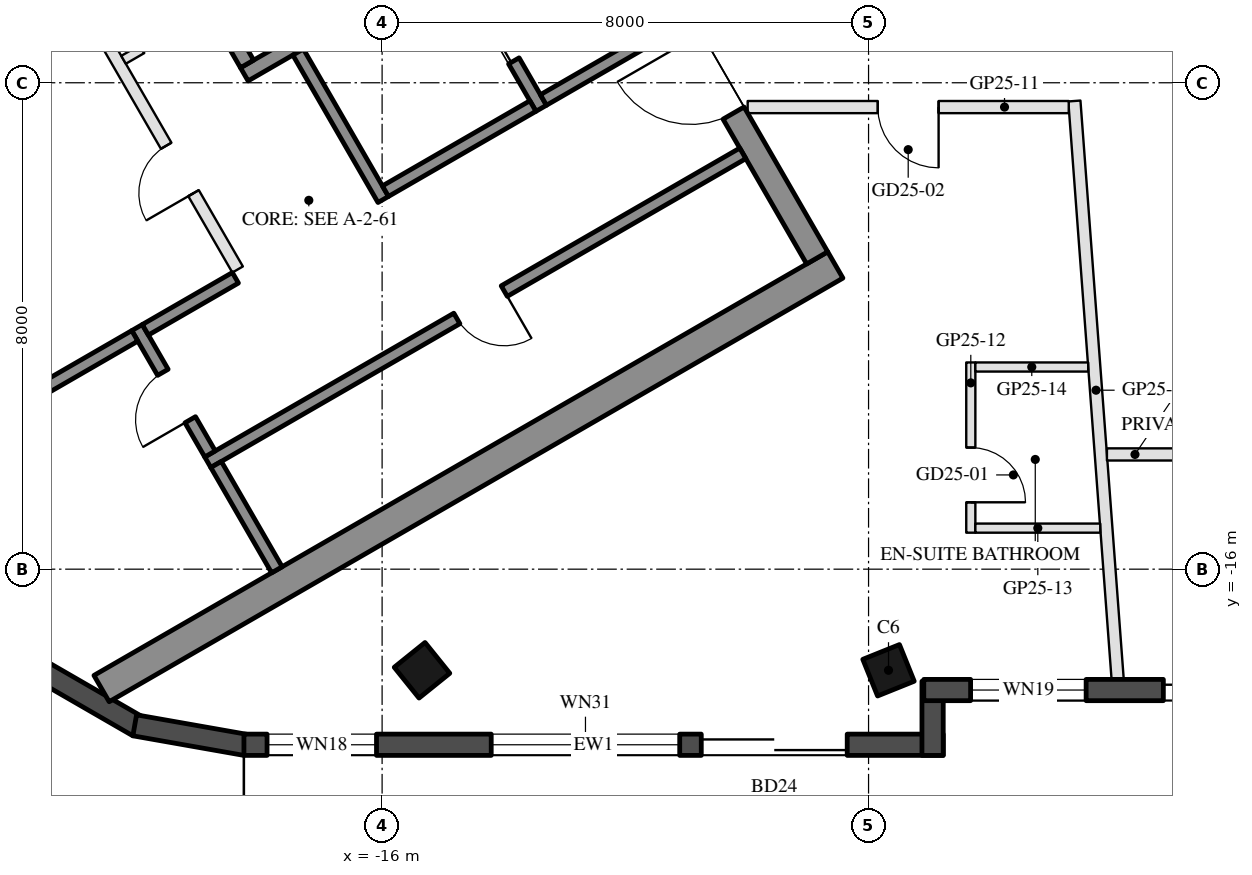
"""IFC4 building model, lengths in metres.
Left out: names, types, materials, properties, quantities, classifications, styles, units other than length and angle.
Written with IfcOpenShell. Run it as: python <this file> out.ifc"""

import sys

from ifc_helpers import new_model, si_unit, direction, frame, frame_2d, origin, origin_2d, place, context, subcontext, project, spatial, rectangle, hollow_rectangle, extrude, boolean, halfspace, element, fill, save


model = new_model("IFC4")
c1 = context("Model", 3, precision=1e-05, world=origin(), true_north=direction((0.0, 1.0)))
c2 = subcontext(c1, "Body", "Model", "MODEL_VIEW")
j1 = project(units=[si_unit("LENGTHUNIT", "METRE"), si_unit("PLANEANGLEUNIT", "RADIAN")], contexts=[c1])
p1 = place(None, origin())
s1 = spatial("IfcSite", under=j1, at=p1, CompositionType="ELEMENT")
p2 = place(p1, origin())
s2 = spatial("IfcBuilding", under=s1, at=p2, CompositionType="ELEMENT")
p3 = place(p2, frame((0.0, 0.0, 265.2)))
s3 = spatial("IfcBuildingStorey", under=s2, at=p3, CompositionType="ELEMENT", Elevation=265.2)
p4 = place(p3, frame((-15.344, -17.663, 0.0), z_axis=(0.121006106938, 0.150399778714, 0.981191840899), x_axis=(-0.992606962496, 0.008942251163, 0.121043191254)))
e1 = element("IfcColumn", 1, at=p4, inside=s3, PredefinedType="COLUMN", context=c2, shape_type="SweptSolid", body=[
    boolean("DIFFERENCE", boolean("DIFFERENCE", extrude(hollow_rectangle(XDim=0.65, YDim=0.65, WallThickness=0.03, at=origin_2d()), origin(), (0.0, 0.0, 1.0), 3.771), halfspace(frame((0.0, 0.0, 0.047), z_axis=(0.0, 0.0, 1.0), x_axis=(1.0, 0.0, 0.0)), True)), halfspace(frame((0.0, 0.0, 3.724), z_axis=(0.0, 0.0, 1.0), x_axis=(1.0, 0.0, 0.0)), False)),
])
p5 = place(p3, frame((-7.672, -17.663, 0.0), z_axis=(0.060870463553, 0.151232178432, 0.986622326361), x_axis=(-0.99813528898, 0.004713590867, 0.06085825296)))
e2 = element("IfcColumn", 2, at=p5, inside=s3, PredefinedType="COLUMN", context=c2, shape_type="SweptSolid", body=[
    boolean("DIFFERENCE", boolean("DIFFERENCE", extrude(hollow_rectangle(XDim=0.65, YDim=0.65, WallThickness=0.03, at=origin_2d()), origin(), (0.0, 0.0, 1.0), 3.75), halfspace(frame((0.0, 0.0, 0.04), z_axis=(0.0, 0.0, 1.0), x_axis=(1.0, 0.0, 0.0)), True)), halfspace(frame((0.0, 0.0, 3.71), z_axis=(0.0, 0.0, 1.0), x_axis=(1.0, 0.0, 0.0)), False)),
])
p6 = place(p3, frame((-23.102, -13.338, 0.0), z_axis=(0.190346159062, 0.109881938965, 0.975548204457), x_axis=(-0.499994868029, 0.866028366632, 1.1507946e-05)))
e3 = element("IfcColumn", 3, at=p6, inside=s3, PredefinedType="COLUMN", context=c2, shape_type="SweptSolid", body=[
    boolean("DIFFERENCE", boolean("DIFFERENCE", extrude(hollow_rectangle(XDim=2.0, YDim=2.0, WallThickness=0.05, at=origin_2d()), origin(), (0.0, 0.0, 1.0), 3.793), halfspace(frame((0.0, 0.0, 0.113), z_axis=(0.0, 0.0, 1.0), x_axis=(1.0, 0.0, 0.0)), True)), halfspace(frame((0.0, 0.0, 3.679), z_axis=(0.0, 0.0, 1.0), x_axis=(1.0, 0.0, 0.0)), False)),
])
p7 = place(p3, frame((-21.618, -17.662, 0.0), z_axis=(0.0, 0.0, 1.0), x_axis=(0.866080385203, -0.499904757295, 0.0)))
e4 = element("IfcWall", 4, at=p7, inside=s3, PredefinedType="SOLIDWALL", context=c2, shape_type="SweptSolid", body=[
    extrude(rectangle(XDim=1.855, YDim=0.35, at=frame_2d((0.927, 0.0))), origin(), (0.0, 0.0, 1.0), 3.55),
])
p8 = place(p3, frame((-20.069, -18.568, 0.0), z_axis=(0.0, 0.0, 1.0), x_axis=(0.984791508075, -0.173740282098, 0.0)))
e5 = element("IfcWall", 5, at=p8, inside=s3, PredefinedType="SOLIDWALL", context=c2, shape_type="SweptSolid", body=[
    extrude(rectangle(XDim=1.855, YDim=0.35, at=frame_2d((0.927, 0.0))), origin(), (0.0, 0.0, 1.0), 3.55),
])
p9 = place(p3, frame((-18.272, -18.888, 0.0), z_axis=(0.0, 0.0, 1.0), x_axis=(1.0, 0.0, 0.0)))
e6 = element("IfcWall", 6, at=p9, inside=s3, PredefinedType="SOLIDWALL", context=c2, shape_type="SweptSolid", body=[
    extrude(rectangle(XDim=11.5, YDim=0.35, at=frame_2d((5.75, 0.0))), origin(), (0.0, 0.0, 1.0), 3.55),
])
p10 = place(p9, frame((0.38, 0.0, 0.3)))
e7 = element("IfcOpeningElement", 7, at=p10, cuts=e6, PredefinedType="OPENING", context=c2, shape_type="SweptSolid", body=[
    extrude(rectangle(XDim=1.8, YDim=2.65, at=frame_2d((0.9, 1.325))), frame((0.0, 0.185, 0.0), z_axis=(0.0, -1.0, 0.0), x_axis=(1.0, 0.0, 0.0)), (0.0, 0.0, 1.0), 0.37),
])
p11 = place(p9, frame((7.521, 0.0, 0.0)))
e8 = element("IfcOpeningElement", 8, at=p11, cuts=e6, PredefinedType="OPENING", context=c2, shape_type="SweptSolid", body=[
    extrude(rectangle(XDim=2.4, YDim=2.4, at=frame_2d((1.2, 1.2))), frame((0.0, 0.185, 0.0), z_axis=(0.0, -1.0, 0.0), x_axis=(1.0, 0.0, 0.0)), (0.0, 0.0, 1.0), 0.37),
])
p12 = place(p9, frame((4.067, 0.0, 0.3)))
e9 = element("IfcOpeningElement", 9, at=p12, cuts=e6, PredefinedType="OPENING", context=c2, shape_type="SweptSolid", body=[
    extrude(rectangle(XDim=3.1, YDim=2.65, at=frame_2d((1.55, 1.325))), frame((0.0, 0.185, 0.0), z_axis=(0.0, -1.0, 0.0), x_axis=(1.0, 0.0, 0.0)), (0.0, 0.0, 1.0), 0.37),
])
p13 = place(p3, frame((-6.947, -19.063, 0.0), z_axis=(0.0, 0.0, 1.0), x_axis=(0.0, 1.0, 0.0)))
e10 = element("IfcWall", 10, at=p13, inside=s3, PredefinedType="SOLIDWALL", context=c2, shape_type="SweptSolid", body=[
    extrude(rectangle(XDim=1.22, YDim=0.35, at=frame_2d((0.61, 0.0))), origin(), (0.0, 0.0, 1.0), 3.55),
])
p14 = place(p3, frame((-7.092, -17.988, 0.0), z_axis=(0.0, 0.0, 1.0), x_axis=(1.0, 0.0, 0.0)))
e11 = element("IfcWall", 11, at=p14, inside=s3, PredefinedType="SOLIDWALL", context=c2, shape_type="SweptSolid", body=[
    extrude(rectangle(XDim=6.512, YDim=0.35, at=frame_2d((3.256, 0.0))), origin(), (0.0, 0.0, 1.0), 3.55),
])
p15 = place(p14, frame((0.77, 0.0, 0.3)))
e12 = element("IfcOpeningElement", 12, at=p15, cuts=e11, PredefinedType="OPENING", context=c2, shape_type="SweptSolid", body=[
    extrude(rectangle(XDim=1.9, YDim=2.65, at=frame_2d((0.95, 1.325))), frame((0.0, 0.185, 0.0), z_axis=(0.0, -1.0, 0.0), x_axis=(1.0, 0.0, 0.0)), (0.0, 0.0, 1.0), 0.37),
])
p16 = place(p14, frame((3.94, 0.0, 0.0)))
e13 = element("IfcOpeningElement", 13, at=p16, cuts=e11, PredefinedType="OPENING", context=c2, shape_type="SweptSolid", body=[
    extrude(rectangle(XDim=1.5, YDim=2.4, at=frame_2d((0.75, 1.2))), frame((0.0, 0.185, 0.0), z_axis=(0.0, -1.0, 0.0), x_axis=(1.0, 0.0, 0.0)), (0.0, 0.0, 1.0), 0.37),
])
for number, where, z_axis, x_axis in (
    (14, (-13.797, -1.903, 0.0), (0.0, 0.0, 1.0), (-0.866, -0.5, 0.0)),
    (15, (-8.547, -10.997, 0.0), (0.0, 0.0, 1.0), (-0.866, -0.5, 0.0)),
):
    element("IfcWall", number, at=place(p3, frame(where, z_axis=z_axis, x_axis=x_axis)), inside=s3, PredefinedType="SHEAR", context=c2, shape_type="SweptSolid", body=[
        extrude(rectangle(XDim=13.934, YDim=0.5, at=frame_2d((6.967, 0.0))), origin(), (0.0, 0.0, 1.0), 3.5),
    ])
p17 = place(p3, frame((-13.845, -2.22, 0.0), z_axis=(0.0, 0.0, 1.0), x_axis=(0.500004234368, -0.866022959057, 0.0)))
e16 = element("IfcWall", 16, at=p17, inside=s3, PredefinedType="SHEAR", context=c2, shape_type="SweptSolid", body=[
    extrude(rectangle(XDim=10.0, YDim=0.4, at=frame_2d((5.0, 0.0))), origin(), (0.0, 0.0, 1.0), 3.5),
])
p18 = place(p17, frame((3.55, 0.0, 0.0)))
e17 = element("IfcOpeningElement", 17, at=p18, cuts=e16, PredefinedType="OPENING", context=c2, shape_type="SweptSolid", body=[
    extrude(rectangle(XDim=1.1, YDim=2.1, at=frame_2d((0.55, 1.05))), frame((0.0, 0.21, 0.0), z_axis=(0.0, -1.0, 0.0), x_axis=(1.0, 0.0, 0.0)), (0.0, 0.0, 1.0), 0.42),
])
p19 = place(p17, frame((5.85, 0.0, 0.0)))
e18 = element("IfcOpeningElement", 18, at=p19, cuts=e16, PredefinedType="OPENING", context=c2, shape_type="SweptSolid", body=[
    extrude(rectangle(XDim=1.4, YDim=2.1, at=frame_2d((0.7, 1.05))), frame((0.0, 0.21, 0.0), z_axis=(0.0, -1.0, 0.0), x_axis=(1.0, 0.0, 0.0)), (0.0, 0.0, 1.0), 0.42),
])
p20 = place(p3, frame((-12.681, -4.636, 0.0), z_axis=(0.0, 0.0, 1.0), x_axis=(-0.866021702275, -0.500006411147, 0.0)))
e19 = element("IfcWall", 19, at=p20, inside=s3, PredefinedType="SHEAR", context=c2, shape_type="SweptSolid", body=[
    extrude(rectangle(XDim=6.45, YDim=0.25, at=frame_2d((3.225, 0.0))), origin(), (0.0, 0.0, 1.0), 3.5),
])
p21 = place(p20, frame((0.3, 0.0, 0.0)))
e20 = element("IfcOpeningElement", 20, at=p21, cuts=e19, PredefinedType="OPENING", context=c2, shape_type="SweptSolid", body=[
    extrude(rectangle(XDim=1.0, YDim=2.1, at=frame_2d((0.5, 1.05))), frame((0.0, 0.135, 0.0), z_axis=(0.0, -1.0, 0.0), x_axis=(1.0, 0.0, 0.0)), (0.0, 0.0, 1.0), 0.27),
])
p22 = place(p3, frame((-19.496, -5.482, 0.0), z_axis=(0.0, 0.0, 1.0), x_axis=(0.499990435942, -0.866030925526, 0.0)))
e21 = element("IfcWall", 21, at=p22, inside=s3, PredefinedType="SHEAR", context=c2, shape_type="SweptSolid", body=[
    extrude(rectangle(XDim=2.55, YDim=0.25, at=frame_2d((1.275, 0.0))), origin(), (0.0, 0.0, 1.0), 3.5),
])
p23 = place(p3, frame((-17.381, -7.495, 0.0), z_axis=(0.0, 0.0, 1.0), x_axis=(0.500011755427, -0.866018616679, 0.0)))
e22 = element("IfcWall", 22, at=p23, inside=s3, PredefinedType="SHEAR", context=c2, shape_type="SweptSolid", body=[
    extrude(rectangle(XDim=2.8, YDim=0.2, at=frame_2d((1.4, 0.0))), origin(), (0.0, 0.0, 1.0), 3.5),
])
p24 = place(p3, frame((-14.783, -5.995, 0.0), z_axis=(0.0, 0.0, 1.0), x_axis=(0.49994636267, -0.866056369097, 0.0)))
e23 = element("IfcWall", 23, at=p24, inside=s3, PredefinedType="SHEAR", context=c2, shape_type="SweptSolid", body=[
    extrude(rectangle(XDim=2.8, YDim=0.2, at=frame_2d((1.4, 0.0))), origin(), (0.0, 0.0, 1.0), 3.5),
])
p25 = place(p24, frame((0.7, 0.0, 0.0)))
e24 = element("IfcOpeningElement", 24, at=p25, cuts=e23, PredefinedType="OPENING", context=c2, shape_type="SweptSolid", body=[
    extrude(rectangle(XDim=1.2, YDim=2.1, at=frame_2d((0.6, 1.05))), frame((0.0, 0.11, 0.0), z_axis=(0.0, -1.0, 0.0), x_axis=(1.0, 0.0, 0.0)), (0.0, 0.0, 1.0), 0.22),
])
p26 = place(p3, frame((-13.52, -8.383, 0.0), z_axis=(0.0, 0.0, 1.0), x_axis=(-0.866034573852, -0.49998411664, 0.0)))
e25 = element("IfcWall", 25, at=p26, inside=s3, PredefinedType="SHEAR", context=c2, shape_type="SweptSolid", body=[
    extrude(rectangle(XDim=2.8, YDim=0.2, at=frame_2d((1.4, 0.0))), origin(), (0.0, 0.0, 1.0), 3.5),
])
p27 = place(p3, frame((-11.268, -7.083, 0.0), z_axis=(0.0, 0.0, 1.0), x_axis=(-0.866050077142, -0.499957262057, 0.0)))
e26 = element("IfcWall", 26, at=p27, inside=s3, PredefinedType="SHEAR", context=c2, shape_type="SweptSolid", body=[
    extrude(rectangle(XDim=2.4, YDim=0.2, at=frame_2d((1.2, 0.0))), origin(), (0.0, 0.0, 1.0), 3.5),
])
p28 = place(p3, frame((-10.068, -9.162, 0.0), z_axis=(0.0, 0.0, 1.0), x_axis=(-0.866032725843, -0.499987317609, 0.0)))
e27 = element("IfcWall", 27, at=p28, inside=s3, PredefinedType="SHEAR", context=c2, shape_type="SweptSolid", body=[
    extrude(rectangle(XDim=10.16, YDim=0.2, at=frame_2d((5.08, 0.0))), origin(), (0.0, 0.0, 1.0), 3.5),
])
p29 = place(p28, frame((4.53, 0.0, 0.0)))
e28 = element("IfcOpeningElement", 28, at=p29, cuts=e27, PredefinedType="OPENING", context=c2, shape_type="SweptSolid", body=[
    extrude(rectangle(XDim=0.9, YDim=2.1, at=frame_2d((0.45, 1.05))), frame((0.0, 0.11, 0.0), z_axis=(0.0, -1.0, 0.0), x_axis=(1.0, 0.0, 0.0)), (0.0, 0.0, 1.0), 0.22),
])
p30 = place(p3, frame((-20.031, -12.026, 0.0), z_axis=(0.0, 0.0, 1.0), x_axis=(0.500033551112, -0.866006032174, 0.0)))
e29 = element("IfcWall", 29, at=p30, inside=s3, PredefinedType="SHEAR", context=c2, shape_type="SweptSolid", body=[
    extrude(rectangle(XDim=2.4, YDim=0.2, at=frame_2d((1.2, 0.0))), origin(), (0.0, 0.0, 1.0), 3.5),
])
p31 = place(p30, frame((0.85, 0.0, 0.0)))
e30 = element("IfcOpeningElement", 30, at=p31, cuts=e29, PredefinedType="OPENING", context=c2, shape_type="SweptSolid", body=[
    extrude(rectangle(XDim=0.9, YDim=2.1, at=frame_2d((0.45, 1.05))), frame((0.0, 0.11, 0.0), z_axis=(0.0, -1.0, 0.0), x_axis=(1.0, 0.0, 0.0)), (0.0, 0.0, 1.0), 0.22),
])
p32 = place(p3, frame((-18.413, -11.208, 0.0), z_axis=(0.0, 0.0, 1.0), x_axis=(-0.866038183914, -0.499977863513, 0.0)))
e31 = element("IfcWall", 31, at=p32, inside=s3, PredefinedType="SHEAR", context=c2, shape_type="SweptSolid", body=[
    extrude(rectangle(XDim=1.71, YDim=0.2, at=frame_2d((0.855, 0.0))), origin(), (0.0, 0.0, 1.0), 3.5),
])
p33 = place(p3, frame((-18.73, -14.278, 0.0), z_axis=(0.0, 0.0, 1.0), x_axis=(0.50002537861, -0.866010750942, 0.0)))
e32 = element("IfcWall", 32, at=p33, inside=s3, PredefinedType="SHEAR", context=c2, shape_type="SweptSolid", body=[
    extrude(rectangle(XDim=2.0, YDim=0.2, at=frame_2d((1.0, 0.0))), origin(), (0.0, 0.0, 1.0), 3.5),
])
p34 = place(p3, frame((-20.067, -12.163, 0.0), z_axis=(0.0, 0.0, 1.0), x_axis=(-0.866079196458, -0.49990681678, 0.0)))
e33 = element("IfcWall", 33, at=p34, inside=s3, PredefinedType="SHEAR", context=c2, shape_type="SweptSolid", body=[
    extrude(rectangle(XDim=2.216, YDim=0.2, at=frame_2d((1.108, 0.0))), origin(), (0.0, 0.0, 1.0), 3.5),
])
p35 = place(p3, frame((-21.076, -6.395, 0.0), z_axis=(0.0, 0.0, 1.0), x_axis=(0.50001468107, -0.866016927499, 0.0)))
e34 = element("IfcWall", 34, at=p35, inside=s3, PredefinedType="PARTITIONING", context=c2, shape_type="SweptSolid", body=[
    extrude(rectangle(XDim=5.4, YDim=0.2, at=frame_2d((2.7, 0.0))), origin(), (0.0, 0.0, 1.0), 3.5),
])
p36 = place(p35, frame((3.05, 0.0, 0.0)))
e35 = element("IfcOpeningElement", 35, at=p36, cuts=e34, PredefinedType="OPENING", context=c2, shape_type="SweptSolid", body=[
    extrude(rectangle(XDim=0.9, YDim=2.1, at=frame_2d((0.45, 1.05))), frame((0.0, 0.11, 0.0), z_axis=(0.0, -1.0, 0.0), x_axis=(1.0, 0.0, 0.0)), (0.0, 0.0, 1.0), 0.22),
])
p37 = place(p3, frame((-18.866, -6.822, 0.0), z_axis=(0.0, 0.0, 1.0), x_axis=(-0.866028054938, -0.499995408039, 0.0)))
e36 = element("IfcWall", 36, at=p37, inside=s3, PredefinedType="PARTITIONING", context=c2, shape_type="SweptSolid", body=[
    extrude(rectangle(XDim=1.6, YDim=0.15, at=frame_2d((0.8, 0.0))), origin(), (0.0, 0.0, 1.0), 3.5),
])
p38 = place(p37, frame((0.35, 0.0, 0.0)))
e37 = element("IfcOpeningElement", 37, at=p38, cuts=e36, PredefinedType="OPENING", context=c2, shape_type="SweptSolid", body=[
    extrude(rectangle(XDim=0.9, YDim=2.1, at=frame_2d((0.45, 1.05))), frame((0.0, 0.085, 0.0), z_axis=(0.0, -1.0, 0.0), x_axis=(1.0, 0.0, 0.0)), (0.0, 0.0, 1.0), 0.17),
])
p39 = place(p3, frame((-3.903, -17.813, 0.0), z_axis=(0.0, 0.0, 1.0), x_axis=(-0.074602257677, 0.997213368918, 0.0)))
e38 = element("IfcWall", 38, at=p39, inside=s3, PredefinedType="PARTITIONING", context=c2, shape_type="SweptSolid", body=[
    extrude(rectangle(XDim=9.54, YDim=0.2, at=frame_2d((4.77, 0.0))), origin(), (0.0, 0.0, 1.0), 3.1),
])
p40 = place(p3, frame((-4.708, -8.4, 0.0), z_axis=(0.0, 0.0, 1.0), x_axis=(-1.0, 0.0, 0.0)))
e39 = element("IfcWall", 39, at=p40, inside=s3, PredefinedType="PARTITIONING", context=c2, shape_type="SweptSolid", body=[
    extrude(rectangle(XDim=5.281, YDim=0.2, at=frame_2d((2.64, 0.0))), origin(), (0.0, 0.0, 1.0), 3.0),
])
p41 = place(p40, frame((2.14, 0.0, 0.0)))
e40 = element("IfcOpeningElement", 40, at=p41, cuts=e39, PredefinedType="OPENING", context=c2, shape_type="SweptSolid", body=[
    extrude(rectangle(XDim=1.0, YDim=2.1, at=frame_2d((0.5, 1.05))), frame((0.0, 0.11, 0.0), z_axis=(0.0, -1.0, 0.0), x_axis=(1.0, 0.0, 0.0)), (0.0, 0.0, 1.0), 0.22),
])
p42 = place(p3, frame((-6.319, -12.6, 0.0), z_axis=(0.0, 0.0, 1.0), x_axis=(0.0, -1.0, 0.0)))
e41 = element("IfcWall", 41, at=p42, inside=s3, PredefinedType="PARTITIONING", context=c2, shape_type="SweptSolid", body=[
    extrude(rectangle(XDim=2.8, YDim=0.15, at=frame_2d((1.4, 0.0))), origin(), (0.0, 0.0, 1.0), 3.55),
])
p43 = place(p42, frame((1.4, 0.0, 0.0)))
e42 = element("IfcOpeningElement", 42, at=p43, cuts=e41, PredefinedType="OPENING", context=c2, shape_type="SweptSolid", body=[
    extrude(rectangle(XDim=0.9, YDim=2.1, at=frame_2d((0.45, 1.05))), frame((0.0, 0.085, 0.0), z_axis=(0.0, -1.0, 0.0), x_axis=(1.0, 0.0, 0.0)), (0.0, 0.0, 1.0), 0.17),
])
p44 = place(p3, frame((-6.243, -15.325, 0.0), z_axis=(0.0, 0.0, 1.0), x_axis=(1.0, 0.0, 0.0)))
e43 = element("IfcWall", 43, at=p44, inside=s3, PredefinedType="PARTITIONING", context=c2, shape_type="SweptSolid", body=[
    extrude(rectangle(XDim=2.054, YDim=0.15, at=frame_2d((1.027, 0.0))), origin(), (0.0, 0.0, 1.0), 3.55),
])
p45 = place(p3, frame((-6.243, -12.675, 0.0), z_axis=(0.0, 0.0, 1.0), x_axis=(1.0, 0.0, 0.0)))
e44 = element("IfcWall", 44, at=p45, inside=s3, PredefinedType="PARTITIONING", context=c2, shape_type="SweptSolid", body=[
    extrude(rectangle(XDim=1.855, YDim=0.15, at=frame_2d((0.928, 0.0))), origin(), (0.0, 0.0, 1.0), 3.55),
])
p46 = place(p3, frame((-0.235, -14.113, 0.0), z_axis=(0.0, 0.0, 1.0), x_axis=(-1.0, 0.0, 0.0)))
e45 = element("IfcWall", 45, at=p46, inside=s3, PredefinedType="PARTITIONING", context=c2, shape_type="SweptSolid", body=[
    extrude(rectangle(XDim=3.845, YDim=0.2, at=frame_2d((1.922, 0.0))), origin(), (0.0, 0.0, 1.0), 3.0),
])
p47 = place(p46, frame((1.422, 0.0, 0.0)))
e46 = element("IfcOpeningElement", 46, at=p47, cuts=e45, PredefinedType="OPENING", context=c2, shape_type="SweptSolid", body=[
    extrude(rectangle(XDim=1.0, YDim=2.1, at=frame_2d((0.5, 1.05))), frame((0.0, 0.11, 0.0), z_axis=(0.0, -1.0, 0.0), x_axis=(1.0, 0.0, 0.0)), (0.0, 0.0, 1.0), 0.22),
])
p48 = place(p10, origin())
e47 = element("IfcWindow", 47, at=p48, inside=s3, PartitioningType="SINGLE_PANEL", PredefinedType="WINDOW", context=c2, shape_type="SweptSolid", body=[
    extrude(rectangle(XDim=1.8, YDim=2.65, at=frame_2d((0.9, 1.325))), frame((0.0, 0.03, 0.0), z_axis=(0.0, -1.0, 0.0), x_axis=(1.0, 0.0, 0.0)), (0.0, 0.0, 1.0), 0.06),
])
fill(e7, e47)
p49 = place(p11, frame((2.4, 0.0, 0.0), z_axis=(0.0, 0.0, 1.0), x_axis=(-1.0, 0.0, 0.0)))
e48 = element("IfcDoor", 48, at=p49, inside=s3, OperationType="SLIDING_TO_LEFT", PredefinedType="DOOR", context=c2, shape_type="SweptSolid", body=[
    extrude(rectangle(XDim=2.4, YDim=2.4, at=frame_2d((1.2, 1.2))), frame((0.0, 0.025, 0.0), z_axis=(0.0, -1.0, 0.0), x_axis=(1.0, 0.0, 0.0)), (0.0, 0.0, 1.0), 0.05),
])
fill(e8, e48)
p50 = place(p12, origin())
e49 = element("IfcWindow", 49, at=p50, inside=s3, PartitioningType="SINGLE_PANEL", PredefinedType="WINDOW", context=c2, shape_type="SweptSolid", body=[
    extrude(rectangle(XDim=3.1, YDim=2.65, at=frame_2d((1.55, 1.325))), frame((0.0, 0.03, 0.0), z_axis=(0.0, -1.0, 0.0), x_axis=(1.0, 0.0, 0.0)), (0.0, 0.0, 1.0), 0.06),
])
fill(e9, e49)
p51 = place(p15, origin())
e50 = element("IfcWindow", 50, at=p51, inside=s3, PartitioningType="SINGLE_PANEL", PredefinedType="WINDOW", context=c2, shape_type="SweptSolid", body=[
    extrude(rectangle(XDim=1.9, YDim=2.65, at=frame_2d((0.95, 1.325))), frame((0.0, 0.03, 0.0), z_axis=(0.0, -1.0, 0.0), x_axis=(1.0, 0.0, 0.0)), (0.0, 0.0, 1.0), 0.06),
])
fill(e12, e50)
p52 = place(p16, frame((1.5, 0.0, 0.0), z_axis=(0.0, 0.0, 1.0), x_axis=(-1.0, 0.0, 0.0)))
e51 = element("IfcDoor", 51, at=p52, inside=s3, OperationType="SLIDING_TO_LEFT", PredefinedType="DOOR", context=c2, shape_type="SweptSolid", body=[
    extrude(rectangle(XDim=1.5, YDim=2.4, at=frame_2d((0.75, 1.2))), frame((0.0, 0.025, 0.0), z_axis=(0.0, -1.0, 0.0), x_axis=(1.0, 0.0, 0.0)), (0.0, 0.0, 1.0), 0.05),
])
fill(e13, e51)
p53 = place(p25, origin())
e52 = element("IfcDoor", 52, at=p53, inside=s3, OperationType="DOUBLE_DOOR_SLIDING", PredefinedType="DOOR", context=c2, shape_type="SweptSolid", body=[
    extrude(rectangle(XDim=1.2, YDim=2.1, at=frame_2d((0.6, 1.05))), frame((0.0, 0.025, 0.0), z_axis=(0.0, -1.0, 0.0), x_axis=(1.0, 0.0, 0.0)), (0.0, 0.0, 1.0), 0.05),
])
fill(e24, e52)
p54 = place(p29, origin())
e53 = element("IfcDoor", 53, at=p54, inside=s3, OperationType="SINGLE_SWING_LEFT", PredefinedType="DOOR", context=c2, shape_type="SweptSolid", body=[
    extrude(rectangle(XDim=0.9, YDim=2.1, at=frame_2d((0.45, 1.05))), frame((0.0, 0.025, 0.0), z_axis=(0.0, -1.0, 0.0), x_axis=(1.0, 0.0, 0.0)), (0.0, 0.0, 1.0), 0.05),
])
fill(e28, e53)
p55 = place(p31, frame((0.9, 0.0, 0.0), z_axis=(0.0, 0.0, 1.0), x_axis=(-1.0, 0.0, 0.0)))
e54 = element("IfcDoor", 54, at=p55, inside=s3, OperationType="SINGLE_SWING_LEFT", PredefinedType="DOOR", context=c2, shape_type="SweptSolid", body=[
    extrude(rectangle(XDim=0.9, YDim=2.1, at=frame_2d((0.45, 1.05))), frame((0.0, 0.025, 0.0), z_axis=(0.0, -1.0, 0.0), x_axis=(1.0, 0.0, 0.0)), (0.0, 0.0, 1.0), 0.05),
])
fill(e30, e54)
p56 = place(p36, frame((0.9, 0.0, 0.0), z_axis=(0.0, 0.0, 1.0), x_axis=(-1.0, 0.0, 0.0)))
e55 = element("IfcDoor", 55, at=p56, inside=s3, OperationType="SINGLE_SWING_LEFT", PredefinedType="DOOR", context=c2, shape_type="SweptSolid", body=[
    extrude(rectangle(XDim=0.9, YDim=2.1, at=frame_2d((0.45, 1.05))), frame((0.0, 0.025, 0.0), z_axis=(0.0, -1.0, 0.0), x_axis=(1.0, 0.0, 0.0)), (0.0, 0.0, 1.0), 0.05),
])
fill(e35, e55)
p57 = place(p19, frame((1.4, 0.0, 0.0), z_axis=(0.0, 0.0, 1.0), x_axis=(-1.0, 0.0, 0.0)))
e56 = element("IfcDoor", 56, at=p57, inside=s3, OperationType="DOUBLE_DOOR_SINGLE_SWING", PredefinedType="DOOR", context=c2, shape_type="SweptSolid", body=[
    extrude(rectangle(XDim=1.4, YDim=2.1, at=frame_2d((0.7, 1.05))), frame((0.0, 0.025, 0.0), z_axis=(0.0, -1.0, 0.0), x_axis=(1.0, 0.0, 0.0)), (0.0, 0.0, 1.0), 0.05),
])
fill(e18, e56)
p58 = place(p43, origin())
e57 = element("IfcDoor", 57, at=p58, inside=s3, OperationType="SINGLE_SWING_RIGHT", PredefinedType="DOOR", context=c2, shape_type="SweptSolid", body=[
    extrude(rectangle(XDim=0.9, YDim=2.1, at=frame_2d((0.45, 1.05))), frame((0.0, 0.025, 0.0), z_axis=(0.0, -1.0, 0.0), x_axis=(1.0, 0.0, 0.0)), (0.0, 0.0, 1.0), 0.05),
])
fill(e42, e57)
p59 = place(p41, origin())
e58 = element("IfcDoor", 58, at=p59, inside=s3, OperationType="SINGLE_SWING_LEFT", PredefinedType="DOOR", context=c2, shape_type="SweptSolid", body=[
    extrude(rectangle(XDim=1.0, YDim=2.1, at=frame_2d((0.5, 1.05))), frame((0.0, 0.025, 0.0), z_axis=(0.0, -1.0, 0.0), x_axis=(1.0, 0.0, 0.0)), (0.0, 0.0, 1.0), 0.05),
])
fill(e40, e58)
save(model, sys.argv[1])
